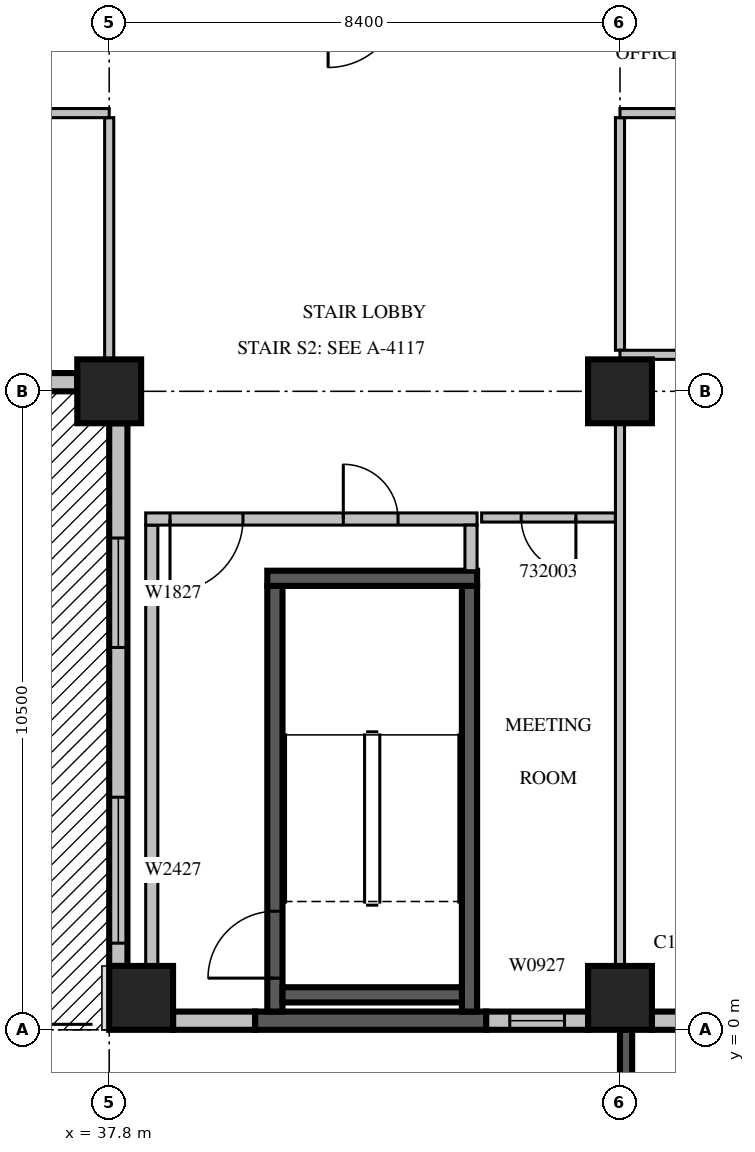
"""IFC4 building model, lengths in metres.
Left out: names, types, materials, properties, quantities, classifications, styles, units other than length and angle.
Written with IfcOpenShell. Run it as: python <this file> out.ifc"""

import sys

from ifc_helpers import new_model, si_unit, direction, frame, frame_2d, origin, origin_2d, place, context, subcontext, project, spatial, rectangle, extrude, source, transform, mapped, element, fill, save


model = new_model("IFC4")
c1 = context("Model", 3, precision=1e-05, world=origin(), true_north=direction((0.0, 1.0)))
c2 = subcontext(c1, "Body", "Model", "MODEL_VIEW")
j1 = project(units=[si_unit("LENGTHUNIT", "METRE"), si_unit("PLANEANGLEUNIT", "RADIAN")], contexts=[c1])
p1 = place(None, origin())
s1 = spatial("IfcSite", under=j1, at=p1, CompositionType="ELEMENT")
p2 = place(p1, origin())
s2 = spatial("IfcBuilding", under=s1, at=p2, CompositionType="ELEMENT")
p3 = place(p2, frame((0.0, 0.0, 145.5)))
s3 = spatial("IfcBuildingStorey", under=s2, at=p3, CompositionType="ELEMENT", Elevation=145.5)
m1 = source(origin(), c2, "Body", "SweptSolid", [
    extrude(rectangle(XDim=1.05, YDim=1.05, at=origin_2d()), origin(), (0.0, 0.0, 1.0), 4.2),
])
for number, where, z_axis, x_axis in (
    (1, (38.325, 0.525, 0.0), (0.0, 0.0, 1.0), (1.0, 0.0, 0.0)),
    (2, (46.2, 0.525, 0.0), (0.0, 0.0, 1.0), (1.0, 0.0, 0.0)),
    (3, (37.8, 10.5, 0.0), (0.0, 0.0, 1.0), (1.0, 0.0, 0.0)),
    (4, (46.2, 10.5, 0.0), (0.0, 0.0, 1.0), (1.0, 0.0, 0.0)),
):
    element("IfcColumn", number, at=place(p3, frame(where, z_axis=z_axis, x_axis=x_axis)), inside=s3, PredefinedType="COLUMN", context=c2, shape_type="MappedRepresentation", body=[
        mapped(m1, transform((0.0, 0.0, 0.0), scale=1.0)),
    ])
m2 = source(origin(), c2, "Body", "SweptSolid", [
    extrude(rectangle(XDim=7.35, YDim=0.3, at=frame_2d((3.675, 0.0))), origin(), (0.0, 0.0, 1.0), 2.8),
])
p4 = place(p3, frame((29.925, 10.65, 0.0), z_axis=(0.0, 0.0, 1.0), x_axis=(1.0, 0.0, 0.0)))
e5 = element("IfcWall", 5, at=p4, inside=s3, PredefinedType="STANDARD", context=c2, shape_type="MappedRepresentation", body=[
    mapped(m2, transform((0.0, 0.0, 0.0), scale=1.0)),
])
m3 = source(origin(), c2, "Body", "SweptSolid", [
    extrude(rectangle(XDim=1.8, YDim=2.4, at=frame_2d((0.9, 1.2))), frame((0.0, 0.16, 0.0), z_axis=(0.0, -1.0, 0.0), x_axis=(1.0, 0.0, 0.0)), (0.0, 0.0, 1.0), 0.32),
])
p5 = place(p4, frame((0.675, 0.0, 0.0)))
e6 = element("IfcOpeningElement", 6, at=p5, cuts=e5, PredefinedType="OPENING", context=c2, shape_type="MappedRepresentation", body=[
    mapped(m3, transform((0.0, 0.0, 0.0), scale=1.0)),
])
p6 = place(p4, frame((4.875, 0.0, 0.0)))
e7 = element("IfcOpeningElement", 7, at=p6, cuts=e5, PredefinedType="OPENING", context=c2, shape_type="MappedRepresentation", body=[
    mapped(m3, transform((0.0, 0.0, 0.0), scale=1.0)),
])
m4 = source(origin(), c2, "Body", "SweptSolid", [
    extrude(rectangle(XDim=8.925, YDim=0.3, at=frame_2d((4.463, 0.0))), origin(), (0.0, 0.0, 1.0), 3.8),
])
p7 = place(p3, frame((37.95, 9.975, 0.0), z_axis=(0.0, 0.0, 1.0), x_axis=(0.0, -1.0, 0.0)))
e8 = element("IfcWall", 8, at=p7, inside=s3, PredefinedType="STANDARD", context=c2, shape_type="MappedRepresentation", body=[
    mapped(m4, transform((0.0, 0.0, 0.0), scale=1.0)),
])
m5 = source(origin(), c2, "Body", "SweptSolid", [
    extrude(rectangle(XDim=1.8, YDim=2.7, at=frame_2d((0.9, 1.35))), frame((0.0, 0.16, 0.0), z_axis=(0.0, -1.0, 0.0), x_axis=(1.0, 0.0, 0.0)), (0.0, 0.0, 1.0), 0.32),
])
p8 = place(p7, frame((1.887, 0.0, 0.6)))
e9 = element("IfcOpeningElement", 9, at=p8, cuts=e8, PredefinedType="OPENING", context=c2, shape_type="MappedRepresentation", body=[
    mapped(m5, transform((0.0, 0.0, 0.0), scale=1.0)),
])
m6 = source(origin(), c2, "Body", "SweptSolid", [
    extrude(rectangle(XDim=2.4, YDim=2.7, at=frame_2d((1.2, 1.35))), frame((0.0, 0.16, 0.0), z_axis=(0.0, -1.0, 0.0), x_axis=(1.0, 0.0, 0.0)), (0.0, 0.0, 1.0), 0.32),
])
p9 = place(p7, frame((6.15, 0.0, 0.6)))
e10 = element("IfcOpeningElement", 10, at=p9, cuts=e8, PredefinedType="OPENING", context=c2, shape_type="MappedRepresentation", body=[
    mapped(m6, transform((0.0, 0.0, 0.0), scale=1.0)),
])
m7 = source(origin(), c2, "Body", "SweptSolid", [
    extrude(rectangle(XDim=1.35, YDim=0.3, at=frame_2d((0.675, 0.0))), origin(), (0.0, 0.0, 1.0), 3.8),
])
p10 = place(p3, frame((38.85, 0.15, 0.0), z_axis=(0.0, 0.0, 1.0), x_axis=(1.0, 0.0, 0.0)))
e11 = element("IfcWall", 11, at=p10, inside=s3, PredefinedType="STANDARD", context=c2, shape_type="MappedRepresentation", body=[
    mapped(m7, transform((0.0, 0.0, 0.0), scale=1.0)),
])
m8 = source(origin(), c2, "Body", "SweptSolid", [
    extrude(rectangle(XDim=3.8, YDim=0.3, at=frame_2d((1.9, 0.0))), origin(), (0.0, 0.0, 1.0), 3.8),
])
p11 = place(p3, frame((40.2, 0.15, 0.0), z_axis=(0.0, 0.0, 1.0), x_axis=(1.0, 0.0, 0.0)))
e12 = element("IfcWall", 12, at=p11, inside=s3, PredefinedType="SOLIDWALL", context=c2, shape_type="MappedRepresentation", body=[
    mapped(m8, transform((0.0, 0.0, 0.0), scale=1.0)),
])
m9 = source(origin(), c2, "Body", "SweptSolid", [
    extrude(rectangle(XDim=1.675, YDim=0.3, at=frame_2d((0.838, 0.0))), origin(), (0.0, 0.0, 1.0), 3.8),
])
p12 = place(p3, frame((44.0, 0.15, 0.0), z_axis=(0.0, 0.0, 1.0), x_axis=(1.0, 0.0, 0.0)))
e13 = element("IfcWall", 13, at=p12, inside=s3, PredefinedType="STANDARD", context=c2, shape_type="MappedRepresentation", body=[
    mapped(m9, transform((0.0, 0.0, 0.0), scale=1.0)),
])
m10 = source(origin(), c2, "Body", "SweptSolid", [
    extrude(rectangle(XDim=0.9, YDim=2.7, at=frame_2d((0.45, 1.35))), frame((0.0, 0.16, 0.0), z_axis=(0.0, -1.0, 0.0), x_axis=(1.0, 0.0, 0.0)), (0.0, 0.0, 1.0), 0.32),
])
p13 = place(p12, frame((0.388, 0.0, 0.6)))
e14 = element("IfcOpeningElement", 14, at=p13, cuts=e13, PredefinedType="OPENING", context=c2, shape_type="MappedRepresentation", body=[
    mapped(m10, transform((0.0, 0.0, 0.0), scale=1.0)),
])
m11 = source(origin(), c2, "Body", "SweptSolid", [
    extrude(rectangle(XDim=4.83, YDim=0.3, at=frame_2d((2.415, 0.0))), origin(), (0.0, 0.0, 1.0), 3.8),
])
p14 = place(p3, frame((46.725, 0.15, 0.0), z_axis=(0.0, 0.0, 1.0), x_axis=(1.0, 0.0, 0.0)))
e15 = element("IfcWall", 15, at=p14, inside=s3, PredefinedType="STANDARD", context=c2, shape_type="MappedRepresentation", body=[
    mapped(m11, transform((0.0, 0.0, 0.0), scale=1.0)),
])
m12 = source(origin(), c2, "Body", "SweptSolid", [
    extrude(rectangle(XDim=1.0, YDim=2.1, at=frame_2d((0.5, 1.05))), frame((0.0, 0.16, 0.0), z_axis=(0.0, -1.0, 0.0), x_axis=(1.0, 0.0, 0.0)), (0.0, 0.0, 1.0), 0.32),
])
p15 = place(p14, frame((1.915, 0.0, 0.0)))
e16 = element("IfcOpeningElement", 16, at=p15, cuts=e15, PredefinedType="OPENING", context=c2, shape_type="MappedRepresentation", body=[
    mapped(m12, transform((0.0, 0.0, 0.0), scale=1.0)),
])
m13 = source(origin(), c2, "Body", "SweptSolid", [
    extrude(rectangle(XDim=3.9, YDim=0.2, at=frame_2d((1.95, 0.0))), origin(), (0.0, 0.0, 1.0), 3.79),
])
p16 = place(p3, frame((46.3, 0.0, 0.0), z_axis=(0.0, 0.0, 1.0), x_axis=(0.0, -1.0, 0.0)))
e17 = element("IfcWall", 17, at=p16, inside=s3, PredefinedType="SOLIDWALL", context=c2, shape_type="MappedRepresentation", body=[
    mapped(m13, transform((0.0, 0.0, 0.0), scale=1.0)),
])
m14 = source(origin(), c2, "Body", "SweptSolid", [
    extrude(rectangle(XDim=2.4, YDim=2.7, at=frame_2d((1.2, 1.35))), frame((0.0, 0.11, 0.0), z_axis=(0.0, -1.0, 0.0), x_axis=(1.0, 0.0, 0.0)), (0.0, 0.0, 1.0), 0.22),
])
p17 = place(p16, frame((0.75, 0.0, 0.6)))
e18 = element("IfcOpeningElement", 18, at=p17, cuts=e17, PredefinedType="OPENING", context=c2, shape_type="MappedRepresentation", body=[
    mapped(m14, transform((0.0, 0.0, 0.0), scale=1.0)),
])
m15 = source(origin(), c2, "Body", "SweptSolid", [
    extrude(rectangle(XDim=7.0, YDim=0.25, at=frame_2d((3.5, 0.0))), origin(), (0.0, 0.0, 1.0), 3.8),
])
p18 = place(p3, frame((40.525, 0.3, 0.0), z_axis=(0.0, 0.0, 1.0), x_axis=(0.0, 1.0, 0.0)))
e19 = element("IfcWall", 19, at=p18, inside=s3, PredefinedType="SOLIDWALL", context=c2, shape_type="MappedRepresentation", body=[
    mapped(m15, transform((0.0, 0.0, 0.0), scale=1.0)),
])
m16 = source(origin(), c2, "Body", "SweptSolid", [
    extrude(rectangle(XDim=1.1, YDim=2.1, at=frame_2d((0.55, 1.05))), frame((0.0, 0.135, 0.0), z_axis=(0.0, -1.0, 0.0), x_axis=(1.0, 0.0, 0.0)), (0.0, 0.0, 1.0), 0.27),
])
p19 = place(p18, frame((0.55, 0.0, 0.0)))
e20 = element("IfcOpeningElement", 20, at=p19, cuts=e19, PredefinedType="OPENING", context=c2, shape_type="MappedRepresentation", body=[
    mapped(m16, transform((0.0, 0.0, 0.0), scale=1.0)),
])
p20 = place(p3, frame((43.725, 0.3, 0.0), z_axis=(0.0, 0.0, 1.0), x_axis=(0.0, 1.0, 0.0)))
e21 = element("IfcWall", 21, at=p20, inside=s3, PredefinedType="SOLIDWALL", context=c2, shape_type="MappedRepresentation", body=[
    mapped(m15, transform((0.0, 0.0, 0.0), scale=1.0)),
])
m17 = source(origin(), c2, "Body", "SweptSolid", [
    extrude(rectangle(XDim=3.45, YDim=0.25, at=frame_2d((1.725, 0.0))), origin(), (0.0, 0.0, 1.0), 3.8),
])
p21 = place(p3, frame((40.4, 7.425, 0.0), z_axis=(0.0, 0.0, 1.0), x_axis=(1.0, 0.0, 0.0)))
e22 = element("IfcWall", 22, at=p21, inside=s3, PredefinedType="SOLIDWALL", context=c2, shape_type="MappedRepresentation", body=[
    mapped(m17, transform((0.0, 0.0, 0.0), scale=1.0)),
])
m18 = source(origin(), c2, "Body", "SweptSolid", [
    extrude(rectangle(XDim=2.95, YDim=0.25, at=frame_2d((1.475, 0.0))), origin(), (0.0, 0.0, 1.0), 3.8),
])
p22 = place(p3, frame((40.65, 0.575, 0.0), z_axis=(0.0, 0.0, 1.0), x_axis=(1.0, 0.0, 0.0)))
e23 = element("IfcWall", 23, at=p22, inside=s3, PredefinedType="SOLIDWALL", context=c2, shape_type="MappedRepresentation", body=[
    mapped(m18, transform((0.0, 0.0, 0.0), scale=1.0)),
])
m19 = source(origin(), c2, "Body", "SweptSolid", [
    extrude(rectangle(XDim=8.0, YDim=0.2, at=frame_2d((4.0, 0.0))), origin(), (0.0, 0.0, 1.0), 3.8),
])
p23 = place(p3, frame((38.5, 0.3, 0.0), z_axis=(0.0, 0.0, 1.0), x_axis=(0.0, 1.0, 0.0)))
e24 = element("IfcWall", 24, at=p23, inside=s3, PredefinedType="PARTITIONING", context=c2, shape_type="MappedRepresentation", body=[
    mapped(m19, transform((0.0, 0.0, 0.0), scale=1.0)),
])
m20 = source(origin(), c2, "Body", "SweptSolid", [
    extrude(rectangle(XDim=5.45, YDim=0.2, at=frame_2d((2.725, 0.0))), origin(), (0.0, 0.0, 1.0), 3.8),
])
p24 = place(p3, frame((38.4, 8.4, 0.0), z_axis=(0.0, 0.0, 1.0), x_axis=(1.0, 0.0, 0.0)))
e25 = element("IfcWall", 25, at=p24, inside=s3, PredefinedType="PARTITIONING", context=c2, shape_type="MappedRepresentation", body=[
    mapped(m20, transform((0.0, 0.0, 0.0), scale=1.0)),
])
m21 = source(origin(), c2, "Body", "SweptSolid", [
    extrude(rectangle(XDim=1.2, YDim=2.1, at=frame_2d((0.6, 1.05))), frame((0.0, 0.11, 0.0), z_axis=(0.0, -1.0, 0.0), x_axis=(1.0, 0.0, 0.0)), (0.0, 0.0, 1.0), 0.22),
])
p25 = place(p24, frame((0.4, 0.0, 0.0)))
e26 = element("IfcOpeningElement", 26, at=p25, cuts=e25, PredefinedType="OPENING", context=c2, shape_type="MappedRepresentation", body=[
    mapped(m21, transform((0.0, 0.0, 0.0), scale=1.0)),
])
m22 = source(origin(), c2, "Body", "SweptSolid", [
    extrude(rectangle(XDim=0.9, YDim=2.1, at=frame_2d((0.45, 1.05))), frame((0.0, 0.11, 0.0), z_axis=(0.0, -1.0, 0.0), x_axis=(1.0, 0.0, 0.0)), (0.0, 0.0, 1.0), 0.22),
])
p26 = place(p24, frame((3.25, 0.0, 0.0)))
e27 = element("IfcOpeningElement", 27, at=p26, cuts=e25, PredefinedType="OPENING", context=c2, shape_type="MappedRepresentation", body=[
    mapped(m22, transform((0.0, 0.0, 0.0), scale=1.0)),
])
m23 = source(origin(), c2, "Body", "SweptSolid", [
    extrude(rectangle(XDim=0.75, YDim=0.2, at=frame_2d((0.375, 0.0))), origin(), (0.0, 0.0, 1.0), 3.8),
])
p27 = place(p3, frame((43.75, 7.55, 0.0), z_axis=(0.0, 0.0, 1.0), x_axis=(0.0, 1.0, 0.0)))
e28 = element("IfcWall", 28, at=p27, inside=s3, PredefinedType="PARTITIONING", context=c2, shape_type="MappedRepresentation", body=[
    mapped(m23, transform((0.0, 0.0, 0.0), scale=1.0)),
])
m24 = source(origin(), c2, "Body", "SweptSolid", [
    extrude(rectangle(XDim=2.2, YDim=0.15, at=frame_2d((1.1, 0.0))), origin(), (0.0, 0.0, 1.0), 3.8),
])
p28 = place(p3, frame((46.125, 8.425, 0.0), z_axis=(0.0, 0.0, 1.0), x_axis=(-1.0, 0.0, 0.0)))
e29 = element("IfcWall", 29, at=p28, inside=s3, PredefinedType="PARTITIONING", context=c2, shape_type="MappedRepresentation", body=[
    mapped(m24, transform((0.0, 0.0, 0.0), scale=1.0)),
])
m25 = source(origin(), c2, "Body", "SweptSolid", [
    extrude(rectangle(XDim=0.9, YDim=2.1, at=frame_2d((0.45, 1.05))), frame((0.0, 0.085, 0.0), z_axis=(0.0, -1.0, 0.0), x_axis=(1.0, 0.0, 0.0)), (0.0, 0.0, 1.0), 0.17),
])
p29 = place(p28, frame((0.65, 0.0, 0.0)))
e30 = element("IfcOpeningElement", 30, at=p29, cuts=e29, PredefinedType="OPENING", context=c2, shape_type="MappedRepresentation", body=[
    mapped(m25, transform((0.0, 0.0, 0.0), scale=1.0)),
])
m26 = source(origin(), c2, "Body", "SweptSolid", [
    extrude(rectangle(XDim=3.976, YDim=0.15, at=frame_2d((1.988, 0.0))), origin(), (0.0, 0.0, 1.0), 3.8),
])
p30 = place(p3, frame((37.8, 11.024, 0.0), z_axis=(0.0, 0.0, 1.0), x_axis=(0.0, 1.0, 0.0)))
e31 = element("IfcWall", 31, at=p30, inside=s3, PredefinedType="PARTITIONING", context=c2, shape_type="MappedRepresentation", body=[
    mapped(m26, transform((0.0, 0.0, 0.0), scale=1.0)),
])
m27 = source(origin(), c2, "Body", "SweptSolid", [
    extrude(rectangle(XDim=8.927, YDim=0.15, at=frame_2d((4.463, 0.0))), origin(), (0.0, 0.0, 1.0), 3.8),
])
p31 = place(p3, frame((46.2, 1.049, 0.0), z_axis=(0.0, 0.0, 1.0), x_axis=(0.0, 1.0, 0.0)))
e32 = element("IfcWall", 32, at=p31, inside=s3, PredefinedType="PARTITIONING", context=c2, shape_type="MappedRepresentation", body=[
    mapped(m27, transform((0.0, 0.0, 0.0), scale=1.0)),
])
m28 = source(origin(), c2, "Body", "SweptSolid", [
    extrude(rectangle(XDim=3.825, YDim=0.15, at=frame_2d((1.913, 0.0))), origin(), (0.0, 0.0, 1.0), 3.8),
])
p32 = place(p3, frame((46.2, 11.175, 0.0), z_axis=(0.0, 0.0, 1.0), x_axis=(0.0, 1.0, 0.0)))
e33 = element("IfcWall", 33, at=p32, inside=s3, PredefinedType="PARTITIONING", context=c2, shape_type="MappedRepresentation", body=[
    mapped(m28, transform((0.0, 0.0, 0.0), scale=1.0)),
])
m29 = source(origin(), c2, "Body", "SweptSolid", [
    extrude(rectangle(XDim=24.9, YDim=0.15, at=frame_2d((12.45, 0.0))), origin(), (0.0, 0.0, 1.0), 3.8),
])
p33 = place(p3, frame((71.1, 11.1, 0.0), z_axis=(0.0, 0.0, 1.0), x_axis=(-1.0, 0.0, 0.0)))
e34 = element("IfcWall", 34, at=p33, inside=s3, PredefinedType="PARTITIONING", context=c2, shape_type="MappedRepresentation", body=[
    mapped(m29, transform((0.0, 0.0, 0.0), scale=1.0)),
])
p34 = place(p33, frame((21.51, 0.0, 0.0)))
e35 = element("IfcOpeningElement", 35, at=p34, cuts=e34, PredefinedType="OPENING", context=c2, shape_type="MappedRepresentation", body=[
    mapped(m25, transform((0.0, 0.0, 0.0), scale=1.0)),
])
p35 = place(p33, frame((15.63, 0.0, 0.0)))
e36 = element("IfcOpeningElement", 36, at=p35, cuts=e34, PredefinedType="OPENING", context=c2, shape_type="MappedRepresentation", body=[
    mapped(m25, transform((0.0, 0.0, 0.0), scale=1.0)),
])
p36 = place(p33, frame((9.75, 0.0, 0.0)))
e37 = element("IfcOpeningElement", 37, at=p36, cuts=e34, PredefinedType="OPENING", context=c2, shape_type="MappedRepresentation", body=[
    mapped(m25, transform((0.0, 0.0, 0.0), scale=1.0)),
])
p37 = place(p33, frame((4.645, 0.0, 0.0)))
e38 = element("IfcOpeningElement", 38, at=p37, cuts=e34, PredefinedType="OPENING", context=c2, shape_type="MappedRepresentation", body=[
    mapped(m25, transform((0.0, 0.0, 0.0), scale=1.0)),
])
p38 = place(p33, frame((2.205, 0.0, 0.0)))
e39 = element("IfcOpeningElement", 39, at=p38, cuts=e34, PredefinedType="OPENING", context=c2, shape_type="MappedRepresentation", body=[
    mapped(m25, transform((0.0, 0.0, 0.0), scale=1.0)),
])
m30 = source(origin(), c2, "Body", "SweptSolid", [
    extrude(rectangle(XDim=8.4, YDim=0.15, at=frame_2d((4.2, 0.0))), origin(), (0.0, 0.0, 1.0), 3.3),
])
p39 = place(p3, frame((37.8, 15.075, 0.0), z_axis=(0.0, 0.0, 1.0), x_axis=(-1.0, 0.0, 0.0)))
e40 = element("IfcWall", 40, at=p39, inside=s3, PredefinedType="PARTITIONING", context=c2, shape_type="MappedRepresentation", body=[
    mapped(m30, transform((0.0, 0.0, 0.0), scale=1.0)),
])
m31 = source(origin(), c2, "Body", "SweptSolid", [
    extrude(rectangle(XDim=1.2, YDim=2.1, at=frame_2d((0.6, 1.05))), frame((0.0, 0.085, 0.0), z_axis=(0.0, -1.0, 0.0), x_axis=(1.0, 0.0, 0.0)), (0.0, 0.0, 1.0), 0.17),
])
p40 = place(p39, frame((3.6, 0.0, 0.0)))
e41 = element("IfcOpeningElement", 41, at=p40, cuts=e40, PredefinedType="OPENING", context=c2, shape_type="MappedRepresentation", body=[
    mapped(m31, transform((0.0, 0.0, 0.0), scale=1.0)),
])
p41 = place(p3, frame((71.1, 15.075, 0.0), z_axis=(0.0, 0.0, 1.0), x_axis=(-1.0, 0.0, 0.0)))
e42 = element("IfcWall", 42, at=p41, inside=s3, PredefinedType="PARTITIONING", context=c2, shape_type="MappedRepresentation", body=[
    mapped(m29, transform((0.0, 0.0, 0.0), scale=1.0)),
])
p42 = place(p41, frame((18.42, 0.0, 0.0)))
e43 = element("IfcOpeningElement", 43, at=p42, cuts=e42, PredefinedType="OPENING", context=c2, shape_type="MappedRepresentation", body=[
    mapped(m31, transform((0.0, 0.0, 0.0), scale=1.0)),
])
p43 = place(p41, frame((5.933, 0.0, 0.0)))
e44 = element("IfcOpeningElement", 44, at=p43, cuts=e42, PredefinedType="OPENING", context=c2, shape_type="MappedRepresentation", body=[
    mapped(m31, transform((0.0, 0.0, 0.0), scale=1.0)),
])
m32 = source(origin(), c2, "Body", "SweptSolid", [
    extrude(rectangle(XDim=1.8, YDim=2.7, at=frame_2d((0.9, 1.35))), frame((0.0, 0.03, 0.0), z_axis=(0.0, -1.0, 0.0), x_axis=(1.0, 0.0, 0.0)), (0.0, 0.0, 1.0), 0.06),
])
p44 = place(p8, origin())
e45 = element("IfcWindow", 45, at=p44, inside=s3, PartitioningType="SINGLE_PANEL", PredefinedType="WINDOW", context=c2, shape_type="MappedRepresentation", body=[
    mapped(m32, transform((0.0, 0.0, 0.0), scale=1.0)),
])
fill(e9, e45)
m33 = source(origin(), c2, "Body", "SweptSolid", [
    extrude(rectangle(XDim=2.4, YDim=2.7, at=frame_2d((1.2, 1.35))), frame((0.0, 0.03, 0.0), z_axis=(0.0, -1.0, 0.0), x_axis=(1.0, 0.0, 0.0)), (0.0, 0.0, 1.0), 0.06),
])
p45 = place(p9, origin())
e46 = element("IfcWindow", 46, at=p45, inside=s3, PartitioningType="SINGLE_PANEL", PredefinedType="WINDOW", context=c2, shape_type="MappedRepresentation", body=[
    mapped(m33, transform((0.0, 0.0, 0.0), scale=1.0)),
])
fill(e10, e46)
m34 = source(origin(), c2, "Body", "SweptSolid", [
    extrude(rectangle(XDim=0.9, YDim=2.7, at=frame_2d((0.45, 1.35))), frame((0.0, 0.03, 0.0), z_axis=(0.0, -1.0, 0.0), x_axis=(1.0, 0.0, 0.0)), (0.0, 0.0, 1.0), 0.06),
])
p46 = place(p13, origin())
e47 = element("IfcWindow", 47, at=p46, inside=s3, PartitioningType="SINGLE_PANEL", PredefinedType="WINDOW", context=c2, shape_type="MappedRepresentation", body=[
    mapped(m34, transform((0.0, 0.0, 0.0), scale=1.0)),
])
fill(e14, e47)
m35 = source(origin(), c2, "Body", "SweptSolid", [
    extrude(rectangle(XDim=1.1, YDim=2.1, at=frame_2d((0.55, 1.05))), frame((0.0, 0.025, 0.0), z_axis=(0.0, -1.0, 0.0), x_axis=(1.0, 0.0, 0.0)), (0.0, 0.0, 1.0), 0.05),
])
p47 = place(p19, origin())
e48 = element("IfcDoor", 48, at=p47, inside=s3, OperationType="SINGLE_SWING_LEFT", PredefinedType="DOOR", context=c2, shape_type="MappedRepresentation", body=[
    mapped(m35, transform((0.0, 0.0, 0.0), scale=1.0)),
])
fill(e20, e48)
m36 = source(origin(), c2, "Body", "SweptSolid", [
    extrude(rectangle(XDim=1.2, YDim=2.1, at=frame_2d((0.6, 1.05))), frame((0.0, 0.025, 0.0), z_axis=(0.0, -1.0, 0.0), x_axis=(1.0, 0.0, 0.0)), (0.0, 0.0, 1.0), 0.05),
])
p48 = place(p25, origin())
e49 = element("IfcDoor", 49, at=p48, inside=s3, OperationType="SINGLE_SWING_RIGHT", PredefinedType="DOOR", context=c2, shape_type="MappedRepresentation", body=[
    mapped(m36, transform((0.0, 0.0, 0.0), scale=1.0)),
])
fill(e26, e49)
m37 = source(origin(), c2, "Body", "SweptSolid", [
    extrude(rectangle(XDim=0.9, YDim=2.1, at=frame_2d((0.45, 1.05))), frame((0.0, 0.025, 0.0), z_axis=(0.0, -1.0, 0.0), x_axis=(1.0, 0.0, 0.0)), (0.0, 0.0, 1.0), 0.05),
])
p49 = place(p26, origin())
e50 = element("IfcDoor", 50, at=p49, inside=s3, OperationType="SINGLE_SWING_LEFT", PredefinedType="DOOR", context=c2, shape_type="MappedRepresentation", body=[
    mapped(m37, transform((0.0, 0.0, 0.0), scale=1.0)),
])
fill(e27, e50)
p50 = place(p29, origin())
e51 = element("IfcDoor", 51, at=p50, inside=s3, OperationType="SINGLE_SWING_LEFT", PredefinedType="DOOR", context=c2, shape_type="MappedRepresentation", body=[
    mapped(m37, transform((0.0, 0.0, 0.0), scale=1.0)),
])
fill(e30, e51)
save(model, sys.argv[1])
